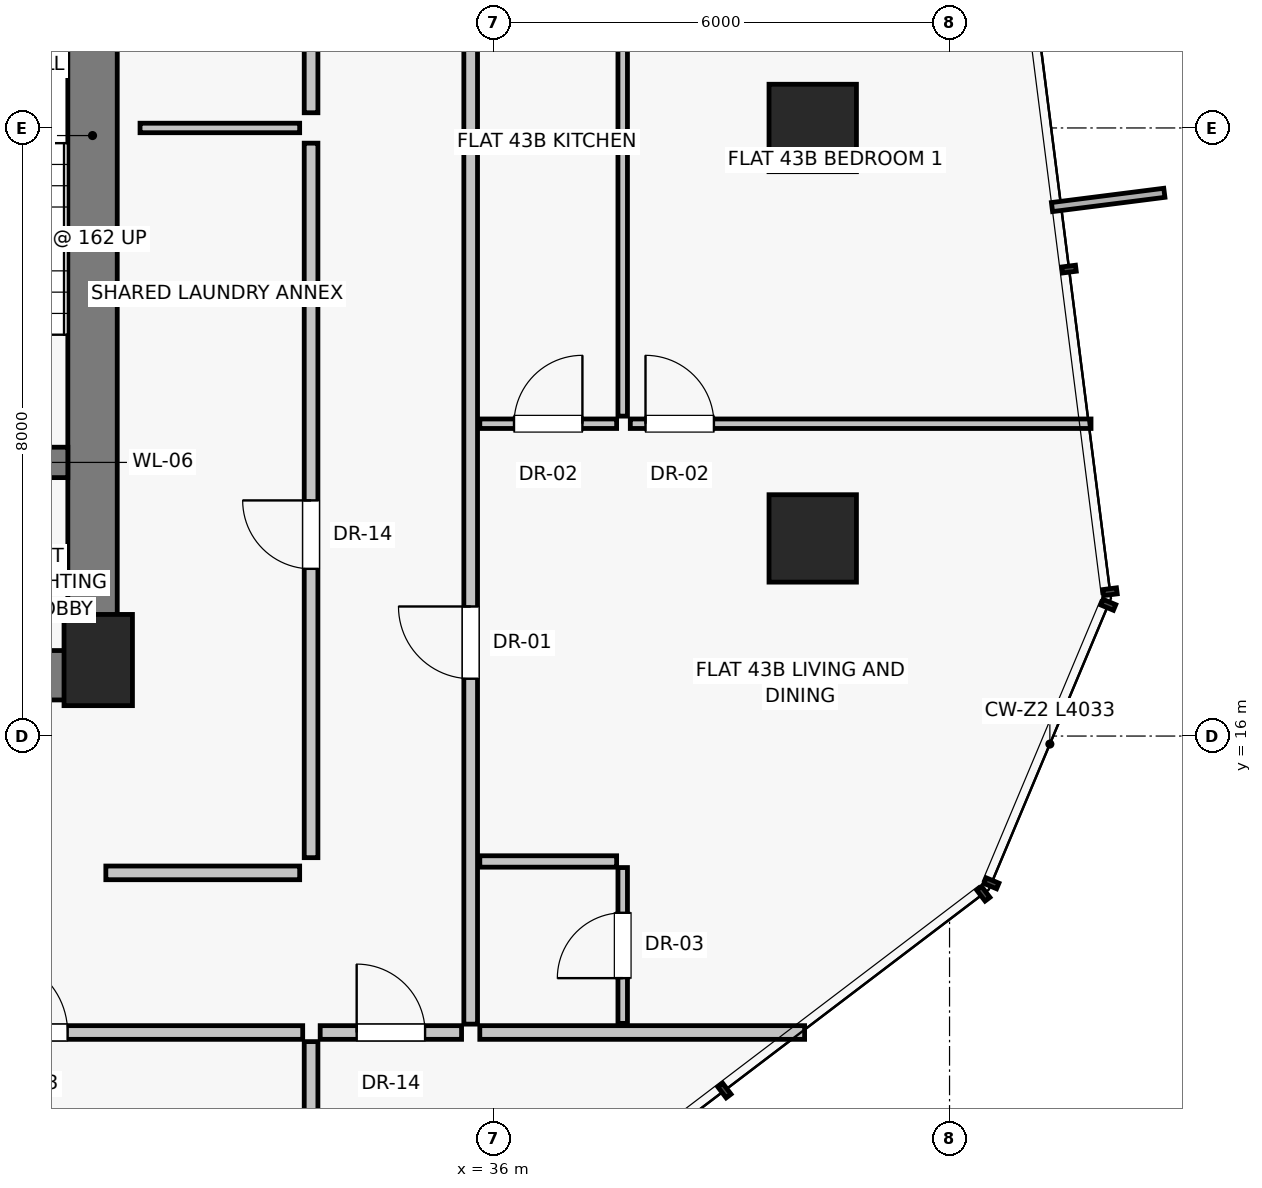
"""IFC4 building model, lengths in metres.
Left out: names, types, materials, properties, quantities, classifications, styles, units other than length and angle.
Written with IfcOpenShell. Run it as: python <this file> out.ifc"""

import sys

from ifc_helpers import new_model, si_unit, direction, frame, frame_2d, origin, origin_2d, place, context, subcontext, project, spatial, rectangle, extrude, source, transform, mapped, element, fill, save


model = new_model("IFC4")
c1 = context("Model", 3, precision=1e-05, world=origin(), true_north=direction((0.0, 1.0)))
c2 = subcontext(c1, "Body", "Model", "MODEL_VIEW")
j1 = project(units=[si_unit("LENGTHUNIT", "METRE"), si_unit("PLANEANGLEUNIT", "RADIAN")], contexts=[c1])
p1 = place(None, origin())
s1 = spatial("IfcSite", under=j1, at=p1, CompositionType="ELEMENT")
p2 = place(p1, origin())
s2 = spatial("IfcBuilding", under=s1, at=p2, CompositionType="ELEMENT")
p3 = place(p2, frame((0.0, 0.0, 152.25)))
s3 = spatial("IfcBuildingStorey", under=s2, at=p3, CompositionType="ELEMENT", Elevation=152.25)
p4 = place(p3, frame((30.8, 17.0, 0.0), z_axis=(0.0, 0.0, 1.0), x_axis=(1.0, 0.0, 0.0)))
e1 = element("IfcColumn", 1, at=p4, inside=s3, PredefinedType="PILASTER", context=c2, shape_type="SweptSolid", body=[
    extrude(rectangle(XDim=0.9, YDim=1.2, at=origin_2d()), origin(), (0.0, 0.0, 1.0), 3.25),
])
for number, where, z_axis, x_axis in (
    (2, (40.2, 18.6, 0.0), (0.0, 0.0, 1.0), (1.0, 0.0, 0.0)),
    (3, (40.2, 24.0, 0.0), (0.0, 0.0, 1.0), (1.0, 0.0, 0.0)),
):
    element("IfcColumn", number, at=place(p3, frame(where, z_axis=z_axis, x_axis=x_axis)), inside=s3, PredefinedType="COLUMN", context=c2, shape_type="SweptSolid", body=[
        extrude(rectangle(XDim=1.15, YDim=1.15, at=origin_2d()), origin(), (0.0, 0.0, 1.0), 3.25),
    ])
p5 = place(p3, frame((30.725, 16.8, 0.0), z_axis=(0.0, 0.0, 1.0), x_axis=(0.0, 1.0, 0.0)))
e4 = element("IfcWall", 4, at=p5, inside=s3, PredefinedType="SHEAR", context=c2, shape_type="SweptSolid", body=[
    extrude(rectangle(XDim=14.2, YDim=0.65, at=frame_2d((7.1, 0.0))), origin(), (0.0, 0.0, 1.0), 3.0),
])
p6 = place(p3, frame((24.95, 16.8, 0.0), z_axis=(0.0, 0.0, 1.0), x_axis=(1.0, 0.0, 0.0)))
e5 = element("IfcWall", 5, at=p6, inside=s3, PredefinedType="SHEAR", context=c2, shape_type="SweptSolid", body=[
    extrude(rectangle(XDim=5.85, YDim=0.65, at=frame_2d((2.925, 0.0))), origin(), (0.0, 0.0, 1.0), 3.0),
])
p7 = place(p6, frame((2.15, 0.0, 0.0)))
e6 = element("IfcOpeningElement", 6, at=p7, cuts=e5, PredefinedType="OPENING", context=c2, shape_type="SweptSolid", body=[
    extrude(rectangle(XDim=1.2, YDim=2.03, at=frame_2d((0.6, 1.015))), frame((0.0, 0.335, 0.0), z_axis=(0.0, -1.0, 0.0), x_axis=(1.0, 0.0, 0.0)), (0.0, 0.0, 1.0), 0.67),
])
p8 = place(p3, frame((27.0, 19.6, 0.0), z_axis=(0.0, 0.0, 1.0), x_axis=(1.0, 0.0, 0.0)))
e7 = element("IfcWall", 7, at=p8, inside=s3, PredefinedType="SHEAR", context=c2, shape_type="SweptSolid", body=[
    extrude(rectangle(XDim=3.4, YDim=0.4, at=frame_2d((1.7, 0.0))), origin(), (0.0, 0.0, 1.0), 3.0),
])
p9 = place(p8, frame((1.05, 0.0, 0.0)))
e8 = element("IfcOpeningElement", 8, at=p9, cuts=e7, PredefinedType="OPENING", context=c2, shape_type="SweptSolid", body=[
    extrude(rectangle(XDim=1.1, YDim=2.03, at=frame_2d((0.55, 1.015))), frame((0.0, 0.21, 0.0), z_axis=(0.0, -1.0, 0.0), x_axis=(1.0, 0.0, 0.0)), (0.0, 0.0, 1.0), 0.42),
])
p10 = place(p3, frame((33.6, 14.4, 0.0), z_axis=(0.0, 0.0, 1.0), x_axis=(0.0, 1.0, 0.0)))
e9 = element("IfcWall", 9, at=p10, inside=s3, PredefinedType="PARTITIONING", context=c2, shape_type="SweptSolid", body=[
    extrude(rectangle(XDim=9.4, YDim=0.18, at=frame_2d((4.7, 0.0))), origin(), (0.0, 0.0, 1.0), 3.0),
])
p11 = place(p10, frame((3.8, 0.0, 0.0)))
e10 = element("IfcOpeningElement", 10, at=p11, cuts=e9, PredefinedType="OPENING", context=c2, shape_type="SweptSolid", body=[
    extrude(rectangle(XDim=0.9, YDim=2.01, at=frame_2d((0.45, 1.005))), frame((0.0, 0.1, 0.0), z_axis=(0.0, -1.0, 0.0), x_axis=(1.0, 0.0, 0.0)), (0.0, 0.0, 1.0), 0.2),
])
p12 = place(p3, frame((33.6, 24.2, 0.0), z_axis=(0.0, 0.0, 1.0), x_axis=(0.0, 1.0, 0.0)))
e11 = element("IfcWall", 11, at=p12, inside=s3, PredefinedType="PARTITIONING", context=c2, shape_type="SweptSolid", body=[
    extrude(rectangle(XDim=9.2, YDim=0.18, at=frame_2d((4.6, 0.0))), origin(), (0.0, 0.0, 1.0), 3.0),
])
p13 = place(p12, frame((3.8, 0.0, 0.0)))
e12 = element("IfcOpeningElement", 12, at=p13, cuts=e11, PredefinedType="OPENING", context=c2, shape_type="SweptSolid", body=[
    extrude(rectangle(XDim=0.9, YDim=2.01, at=frame_2d((0.45, 1.005))), frame((0.0, 0.1, 0.0), z_axis=(0.0, -1.0, 0.0), x_axis=(1.0, 0.0, 0.0)), (0.0, 0.0, 1.0), 0.2),
])
p14 = place(p3, frame((31.35, 24.0, 0.0), z_axis=(0.0, 0.0, 1.0), x_axis=(1.0, 0.0, 0.0)))
e13 = element("IfcWall", 13, at=p14, inside=s3, PredefinedType="PARTITIONING", context=c2, shape_type="SweptSolid", body=[
    extrude(rectangle(XDim=2.1, YDim=0.125, at=frame_2d((1.05, 0.0))), origin(), (0.0, 0.0, 1.0), 3.0),
])
p15 = place(p3, frame((30.9, 14.2, 0.0), z_axis=(0.0, 0.0, 1.0), x_axis=(1.0, 0.0, 0.0)))
e14 = element("IfcWall", 14, at=p15, inside=s3, PredefinedType="PARTITIONING", context=c2, shape_type="SweptSolid", body=[
    extrude(rectangle(XDim=2.55, YDim=0.18, at=frame_2d((1.275, 0.0))), origin(), (0.0, 0.0, 1.0), 3.0),
])
p16 = place(p3, frame((33.6, 11.98, 0.0), z_axis=(0.0, 0.0, 1.0), x_axis=(0.0, -1.0, 0.0)))
e15 = element("IfcWall", 15, at=p16, inside=s3, PredefinedType="PARTITIONING", context=c2, shape_type="SweptSolid", body=[
    extrude(rectangle(XDim=4.816, YDim=0.18, at=frame_2d((2.408, 0.0))), origin(), (0.0, 0.0, 1.0), 3.0),
])
p17 = place(p3, frame((26.304, 12.1, 0.0), z_axis=(0.0, 0.0, 1.0), x_axis=(1.0, 0.0, 0.0)))
e16 = element("IfcWall", 16, at=p17, inside=s3, PredefinedType="PARTITIONING", context=c2, shape_type="SweptSolid", body=[
    extrude(rectangle(XDim=7.186, YDim=0.18, at=frame_2d((3.593, 0.0))), origin(), (0.0, 0.0, 1.0), 2.58),
])
p18 = place(p17, frame((3.093, 0.0, 0.0)))
e17 = element("IfcOpeningElement", 17, at=p18, cuts=e16, PredefinedType="OPENING", context=c2, shape_type="SweptSolid", body=[
    extrude(rectangle(XDim=1.0, YDim=2.01, at=frame_2d((0.5, 1.005))), frame((0.0, 0.1, 0.0), z_axis=(0.0, -1.0, 0.0), x_axis=(1.0, 0.0, 0.0)), (0.0, 0.0, 1.0), 0.2),
])
p19 = place(p3, frame((35.82, 12.1, 0.0), z_axis=(0.0, 0.0, 1.0), x_axis=(1.0, 0.0, 0.0)))
e18 = element("IfcWall", 18, at=p19, inside=s3, PredefinedType="PARTITIONING", context=c2, shape_type="SweptSolid", body=[
    extrude(rectangle(XDim=4.273, YDim=0.18, at=frame_2d((2.136, 0.0))), origin(), (0.0, 0.0, 1.0), 3.0),
])
p20 = place(p3, frame((35.7, 12.21, 0.0), z_axis=(0.0, 0.0, 1.0), x_axis=(0.0, 1.0, 0.0)))
e19 = element("IfcWall", 19, at=p20, inside=s3, PredefinedType="PARTITIONING", context=c2, shape_type="SweptSolid", body=[
    extrude(rectangle(XDim=14.082, YDim=0.18, at=frame_2d((7.041, 0.0))), origin(), (0.0, 0.0, 1.0), 2.58),
])
p21 = place(p20, frame((4.544, 0.0, 0.0)))
e20 = element("IfcOpeningElement", 20, at=p21, cuts=e19, PredefinedType="OPENING", context=c2, shape_type="SweptSolid", body=[
    extrude(rectangle(XDim=0.95, YDim=2.02, at=frame_2d((0.475, 1.01))), frame((0.0, 0.1, 0.0), z_axis=(0.0, -1.0, 0.0), x_axis=(1.0, 0.0, 0.0)), (0.0, 0.0, 1.0), 0.2),
])
p22 = place(p3, frame((35.82, 14.35, 0.0), z_axis=(0.0, 0.0, 1.0), x_axis=(1.0, 0.0, 0.0)))
e21 = element("IfcWall", 21, at=p22, inside=s3, PredefinedType="PARTITIONING", context=c2, shape_type="SweptSolid", body=[
    extrude(rectangle(XDim=1.8, YDim=0.15, at=frame_2d((0.9, 0.0))), origin(), (0.0, 0.0, 1.0), 3.0),
])
p23 = place(p3, frame((37.7, 12.22, 0.0), z_axis=(0.0, 0.0, 1.0), x_axis=(0.0, 1.0, 0.0)))
e22 = element("IfcWall", 22, at=p23, inside=s3, PredefinedType="PARTITIONING", context=c2, shape_type="SweptSolid", body=[
    extrude(rectangle(XDim=2.05, YDim=0.125, at=frame_2d((1.025, 0.0))), origin(), (0.0, 0.0, 1.0), 3.0),
])
p24 = place(p23, frame((0.595, 0.0, 0.0)))
e23 = element("IfcOpeningElement", 23, at=p24, cuts=e22, PredefinedType="OPENING", context=c2, shape_type="SweptSolid", body=[
    extrude(rectangle(XDim=0.86, YDim=2.01, at=frame_2d((0.43, 1.005))), frame((0.0, 0.073, 0.0), z_axis=(0.0, -1.0, 0.0), x_axis=(1.0, 0.0, 0.0)), (0.0, 0.0, 1.0), 0.145),
])
p25 = place(p3, frame((35.82, 20.109, 0.0), z_axis=(0.0, 0.0, 1.0), x_axis=(1.0, 0.0, 0.0)))
e24 = element("IfcWall", 24, at=p25, inside=s3, PredefinedType="PARTITIONING", context=c2, shape_type="SweptSolid", body=[
    extrude(rectangle(XDim=1.8, YDim=0.125, at=frame_2d((0.9, 0.0))), origin(), (0.0, 0.0, 1.0), 3.0),
])
p26 = place(p25, frame((0.45, 0.0, 0.0)))
e25 = element("IfcOpeningElement", 25, at=p26, cuts=e24, PredefinedType="OPENING", context=c2, shape_type="SweptSolid", body=[
    extrude(rectangle(XDim=0.9, YDim=2.01, at=frame_2d((0.45, 1.005))), frame((0.0, 0.073, 0.0), z_axis=(0.0, -1.0, 0.0), x_axis=(1.0, 0.0, 0.0)), (0.0, 0.0, 1.0), 0.145),
])
p27 = place(p3, frame((37.7, 20.209, 0.0), z_axis=(0.0, 0.0, 1.0), x_axis=(0.0, 1.0, 0.0)))
e26 = element("IfcWall", 26, at=p27, inside=s3, PredefinedType="PARTITIONING", context=c2, shape_type="SweptSolid", body=[
    extrude(rectangle(XDim=6.073, YDim=0.125, at=frame_2d((3.037, 0.0))), origin(), (0.0, 0.0, 1.0), 3.0),
])
p28 = place(p3, frame((37.8, 20.109, 0.0), z_axis=(0.0, 0.0, 1.0), x_axis=(1.0, 0.0, 0.0)))
e27 = element("IfcWall", 27, at=p28, inside=s3, PredefinedType="PARTITIONING", context=c2, shape_type="SweptSolid", body=[
    extrude(rectangle(XDim=6.061, YDim=0.125, at=frame_2d((3.031, 0.0))), origin(), (0.0, 0.0, 1.0), 3.0),
])
p29 = place(p28, frame((0.2, 0.0, 0.0)))
e28 = element("IfcOpeningElement", 28, at=p29, cuts=e27, PredefinedType="OPENING", context=c2, shape_type="SweptSolid", body=[
    extrude(rectangle(XDim=0.9, YDim=2.01, at=frame_2d((0.45, 1.005))), frame((0.0, 0.073, 0.0), z_axis=(0.0, -1.0, 0.0), x_axis=(1.0, 0.0, 0.0)), (0.0, 0.0, 1.0), 0.145),
])
p30 = place(p3, frame((33.72, 12.1, 0.0), z_axis=(0.0, 0.0, 1.0), x_axis=(1.0, 0.0, 0.0)))
e29 = element("IfcWall", 29, at=p30, inside=s3, PredefinedType="PARTITIONING", context=c2, shape_type="SweptSolid", body=[
    extrude(rectangle(XDim=1.86, YDim=0.18, at=frame_2d((0.93, 0.0))), origin(), (0.0, 0.0, 1.0), 3.0),
])
p31 = place(p30, frame((0.48, 0.0, 0.0)))
e30 = element("IfcOpeningElement", 30, at=p31, cuts=e29, PredefinedType="OPENING", context=c2, shape_type="SweptSolid", body=[
    extrude(rectangle(XDim=0.9, YDim=2.01, at=frame_2d((0.45, 1.005))), frame((0.0, 0.1, 0.0), z_axis=(0.0, -1.0, 0.0), x_axis=(1.0, 0.0, 0.0)), (0.0, 0.0, 1.0), 0.2),
])
m1 = source(origin(), c2, "Body", "SweptSolid", [
    extrude(rectangle(XDim=0.9, YDim=2.01, at=frame_2d((0.45, 1.005))), frame((0.0, 0.025, 0.0), z_axis=(0.0, -1.0, 0.0), x_axis=(1.0, 0.0, 0.0)), (0.0, 0.0, 1.0), 0.05),
])
p32 = place(p11, origin())
e31 = element("IfcDoor", 31, at=p32, inside=s3, OperationType="SINGLE_SWING_RIGHT", PredefinedType="DOOR", context=c2, shape_type="MappedRepresentation", body=[
    mapped(m1, transform((0.0, 0.0, 0.0), scale=1.0)),
])
fill(e10, e31)
m2 = source(origin(), c2, "Body", "SweptSolid", [
    extrude(rectangle(XDim=1.0, YDim=2.01, at=frame_2d((0.5, 1.005))), frame((0.0, 0.025, 0.0), z_axis=(0.0, -1.0, 0.0), x_axis=(1.0, 0.0, 0.0)), (0.0, 0.0, 1.0), 0.05),
])
p33 = place(p18, origin())
e32 = element("IfcDoor", 32, at=p33, inside=s3, OperationType="SINGLE_SWING_LEFT", PredefinedType="DOOR", context=c2, shape_type="MappedRepresentation", body=[
    mapped(m2, transform((0.0, 0.0, 0.0), scale=1.0)),
])
fill(e17, e32)
m3 = source(origin(), c2, "Body", "SweptSolid", [
    extrude(rectangle(XDim=0.95, YDim=2.02, at=frame_2d((0.475, 1.01))), frame((0.0, 0.025, 0.0), z_axis=(0.0, -1.0, 0.0), x_axis=(1.0, 0.0, 0.0)), (0.0, 0.0, 1.0), 0.05),
])
p34 = place(p21, origin())
e33 = element("IfcDoor", 33, at=p34, inside=s3, OperationType="SINGLE_SWING_RIGHT", PredefinedType="DOOR", context=c2, shape_type="MappedRepresentation", body=[
    mapped(m3, transform((0.0, 0.0, 0.0), scale=1.0)),
])
fill(e20, e33)
m4 = source(origin(), c2, "Body", "SweptSolid", [
    extrude(rectangle(XDim=0.86, YDim=2.01, at=frame_2d((0.43, 1.005))), frame((0.0, 0.025, 0.0), z_axis=(0.0, -1.0, 0.0), x_axis=(1.0, 0.0, 0.0)), (0.0, 0.0, 1.0), 0.05),
])
p35 = place(p24, origin())
e34 = element("IfcDoor", 34, at=p35, inside=s3, OperationType="SINGLE_SWING_LEFT", PredefinedType="DOOR", context=c2, shape_type="MappedRepresentation", body=[
    mapped(m4, transform((0.0, 0.0, 0.0), scale=1.0)),
])
fill(e23, e34)
p36 = place(p26, origin())
e35 = element("IfcDoor", 35, at=p36, inside=s3, OperationType="SINGLE_SWING_RIGHT", PredefinedType="DOOR", context=c2, shape_type="MappedRepresentation", body=[
    mapped(m1, transform((0.0, 0.0, 0.0), scale=1.0)),
])
fill(e25, e35)
p37 = place(p29, origin())
e36 = element("IfcDoor", 36, at=p37, inside=s3, OperationType="SINGLE_SWING_LEFT", PredefinedType="DOOR", context=c2, shape_type="MappedRepresentation", body=[
    mapped(m1, transform((0.0, 0.0, 0.0), scale=1.0)),
])
fill(e28, e36)
p38 = place(p31, origin())
e37 = element("IfcDoor", 37, at=p38, inside=s3, OperationType="SINGLE_SWING_LEFT", PredefinedType="DOOR", context=c2, shape_type="MappedRepresentation", body=[
    mapped(m1, transform((0.0, 0.0, 0.0), scale=1.0)),
])
fill(e30, e37)
save(model, sys.argv[1])
